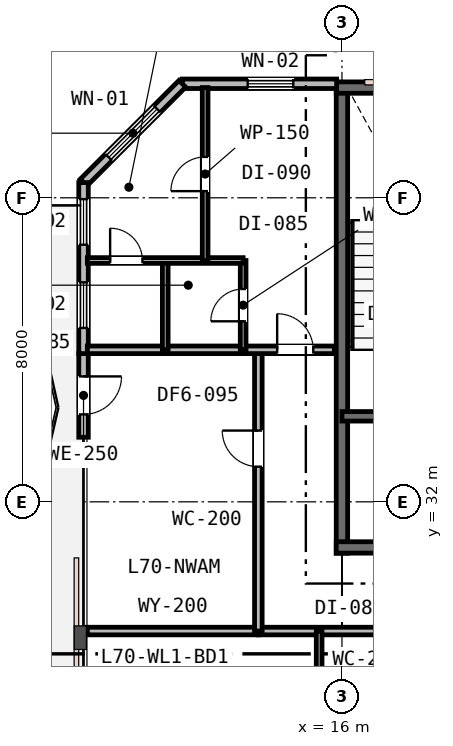
"""IFC4 building model, lengths in metres.
Left out: names, types, materials, properties, quantities, classifications, styles, units other than length and angle.
Written with IfcOpenShell. Run it as: python <this file> out.ifc"""

import sys

from ifc_helpers import new_model, si_unit, direction, frame, frame_2d, origin, place, context, subcontext, project, spatial, rectangle, extrude, element, fill, save


model = new_model("IFC4")
c1 = context("Model", 3, precision=1e-05, world=origin(), true_north=direction((0.0, 1.0)))
c2 = subcontext(c1, "Body", "Model", "MODEL_VIEW")
j1 = project(units=[si_unit("LENGTHUNIT", "METRE"), si_unit("PLANEANGLEUNIT", "RADIAN")], contexts=[c1])
p1 = place(None, origin())
s1 = spatial("IfcSite", under=j1, at=p1, CompositionType="ELEMENT")
p2 = place(p1, origin())
s2 = spatial("IfcBuilding", under=s1, at=p2, CompositionType="ELEMENT")
p3 = place(p2, frame((0.0, 0.0, 271.6)))
s3 = spatial("IfcBuildingStorey", under=s2, at=p3, CompositionType="ELEMENT", Elevation=271.6)
p4 = place(p3, frame((16.0, 30.65, 0.0), z_axis=(0.0, 0.0, 1.0), x_axis=(0.0, 1.0, 0.0)))
e1 = element("IfcWall", 1, at=p4, inside=s3, PredefinedType="SHEAR", context=c2, shape_type="SweptSolid", body=[
    extrude(rectangle(XDim=12.3, YDim=0.3, at=frame_2d((6.15, 0.0))), origin(), (0.0, 0.0, 1.0), 3.8),
])
p5 = place(p3, frame((15.85, 42.9, 0.0), z_axis=(0.0, 0.0, 1.0), x_axis=(1.0, 0.0, 0.0)))
e2 = element("IfcWall", 2, at=p5, inside=s3, PredefinedType="SHEAR", context=c2, shape_type="SweptSolid", body=[
    extrude(rectangle(XDim=24.3, YDim=0.3, at=frame_2d((12.15, 0.0))), origin(), (0.0, 0.0, 1.0), 3.8),
])
p6 = place(p3, frame((15.85, 30.8, 0.0), z_axis=(0.0, 0.0, 1.0), x_axis=(1.0, 0.0, 0.0)))
e3 = element("IfcWall", 3, at=p6, inside=s3, PredefinedType="SHEAR", context=c2, shape_type="SweptSolid", body=[
    extrude(rectangle(XDim=11.2, YDim=0.3, at=frame_2d((5.6, 0.0))), origin(), (0.0, 0.0, 1.0), 3.8),
])
p7 = place(p6, frame((2.45, 0.0, 0.0)))
e4 = element("IfcOpeningElement", 4, at=p7, cuts=e3, PredefinedType="OPENING", context=c2, shape_type="SweptSolid", body=[
    extrude(rectangle(XDim=1.1, YDim=2.15, at=frame_2d((0.55, 1.075))), frame((0.0, 0.16, 0.0), z_axis=(0.0, -1.0, 0.0), x_axis=(1.0, 0.0, 0.0)), (0.0, 0.0, 1.0), 0.32),
])
p8 = place(p3, frame((16.0, 34.25, 0.0), z_axis=(0.0, 0.0, 1.0), x_axis=(1.0, 0.0, 0.0)))
e5 = element("IfcWall", 5, at=p8, inside=s3, PredefinedType="SHEAR", context=c2, shape_type="SweptSolid", body=[
    extrude(rectangle(XDim=6.05, YDim=0.25, at=frame_2d((3.025, 0.0))), origin(), (0.0, 0.0, 1.0), 3.8),
])
p9 = place(p8, frame((1.25, 0.0, 0.0)))
e6 = element("IfcOpeningElement", 6, at=p9, cuts=e5, PredefinedType="OPENING", context=c2, shape_type="SweptSolid", body=[
    extrude(rectangle(XDim=1.0, YDim=2.15, at=frame_2d((0.5, 1.075))), frame((0.0, 0.135, 0.0), z_axis=(0.0, -1.0, 0.0), x_axis=(1.0, 0.0, 0.0)), (0.0, 0.0, 1.0), 0.27),
])
p10 = place(p8, frame((4.2, 0.0, 0.0)))
e7 = element("IfcOpeningElement", 7, at=p10, cuts=e5, PredefinedType="OPENING", context=c2, shape_type="SweptSolid", body=[
    extrude(rectangle(XDim=1.1, YDim=2.15, at=frame_2d((0.55, 1.075))), frame((0.0, 0.135, 0.0), z_axis=(0.0, -1.0, 0.0), x_axis=(1.0, 0.0, 0.0)), (0.0, 0.0, 1.0), 0.27),
])
p11 = place(p3, frame((15.86, 43.0, 0.0), z_axis=(0.0, 0.0, 1.0), x_axis=(-1.0, 0.0, 0.0)))
e8 = element("IfcWall", 8, at=p11, inside=s3, PredefinedType="STANDARD", context=c2, shape_type="SweptSolid", body=[
    extrude(rectangle(XDim=4.06, YDim=0.25, at=frame_2d((2.03, 0.0))), origin(), (0.0, 0.0, 1.0), 3.53),
])
p12 = place(p11, frame((1.14, 0.0, 0.85)))
e9 = element("IfcOpeningElement", 9, at=p12, cuts=e8, PredefinedType="OPENING", context=c2, shape_type="SweptSolid", body=[
    extrude(rectangle(XDim=1.2, YDim=1.6, at=frame_2d((0.6, 0.8))), frame((0.0, 0.135, 0.0), z_axis=(0.0, -1.0, 0.0), x_axis=(1.0, 0.0, 0.0)), (0.0, 0.0, 1.0), 0.27),
])
p13 = place(p3, frame((11.8, 43.0, 0.0), z_axis=(0.0, 0.0, 1.0), x_axis=(-0.707106781187, -0.707106781187, 0.0)))
e10 = element("IfcWall", 10, at=p13, inside=s3, PredefinedType="STANDARD", context=c2, shape_type="SweptSolid", body=[
    extrude(rectangle(XDim=3.677, YDim=0.25, at=frame_2d((1.839, 0.0))), origin(), (0.0, 0.0, 1.0), 3.53),
])
p14 = place(p13, frame((0.939, 0.0, 0.75)))
e11 = element("IfcOpeningElement", 11, at=p14, cuts=e10, PredefinedType="OPENING", context=c2, shape_type="SweptSolid", body=[
    extrude(rectangle(XDim=1.8, YDim=1.85, at=frame_2d((0.9, 0.925))), frame((0.0, 0.135, 0.0), z_axis=(0.0, -1.0, 0.0), x_axis=(1.0, 0.0, 0.0)), (0.0, 0.0, 1.0), 0.27),
])
p15 = place(p3, frame((9.2, 35.9, 0.0), z_axis=(0.0, 0.0, 1.0), x_axis=(0.0, -1.0, 0.0)))
e12 = element("IfcWall", 12, at=p15, inside=s3, PredefinedType="STANDARD", context=c2, shape_type="SweptSolid", body=[
    extrude(rectangle(XDim=2.2, YDim=0.25, at=frame_2d((1.1, 0.0))), origin(), (0.0, 0.0, 1.0), 3.53),
])
p16 = place(p15, frame((0.6, 0.0, 0.0)))
e13 = element("IfcOpeningElement", 13, at=p16, cuts=e12, PredefinedType="OPENING", context=c2, shape_type="SweptSolid", body=[
    extrude(rectangle(XDim=1.0, YDim=2.15, at=frame_2d((0.5, 1.075))), frame((0.0, 0.135, 0.0), z_axis=(0.0, -1.0, 0.0), x_axis=(1.0, 0.0, 0.0)), (0.0, 0.0, 1.0), 0.27),
])
p17 = place(p3, frame((9.2, 40.4, 0.0), z_axis=(0.0, 0.0, 1.0), x_axis=(0.0, -1.0, 0.0)))
e14 = element("IfcWall", 14, at=p17, inside=s3, PredefinedType="STANDARD", context=c2, shape_type="SweptSolid", body=[
    extrude(rectangle(XDim=4.5, YDim=0.25, at=frame_2d((2.25, 0.0))), origin(), (0.0, 0.0, 1.0), 3.53),
])
p18 = place(p17, frame((0.435, 0.0, 0.85)))
e15 = element("IfcOpeningElement", 15, at=p18, cuts=e14, PredefinedType="OPENING", context=c2, shape_type="SweptSolid", body=[
    extrude(rectangle(XDim=1.2, YDim=1.6, at=frame_2d((0.6, 0.8))), frame((0.0, 0.135, 0.0), z_axis=(0.0, -1.0, 0.0), x_axis=(1.0, 0.0, 0.0)), (0.0, 0.0, 1.0), 0.27),
])
p19 = place(p17, frame((2.625, 0.0, 0.85)))
e16 = element("IfcOpeningElement", 16, at=p19, cuts=e14, PredefinedType="OPENING", context=c2, shape_type="SweptSolid", body=[
    extrude(rectangle(XDim=1.2, YDim=1.6, at=frame_2d((0.6, 0.8))), frame((0.0, 0.135, 0.0), z_axis=(0.0, -1.0, 0.0), x_axis=(1.0, 0.0, 0.0)), (0.0, 0.0, 1.0), 0.27),
])
p20 = place(p3, frame((9.3, 28.6, 0.0), z_axis=(0.0, 0.0, 1.0), x_axis=(1.0, 0.0, 0.0)))
e17 = element("IfcWall", 17, at=p20, inside=s3, PredefinedType="PARTITIONING", context=c2, shape_type="SweptSolid", body=[
    extrude(rectangle(XDim=4.5, YDim=0.2, at=frame_2d((2.25, 0.0))), origin(), (0.0, 0.0, 1.0), 3.53),
])
p21 = place(p3, frame((13.8, 28.6, 0.0), z_axis=(0.0, 0.0, 1.0), x_axis=(1.0, 0.0, 0.0)))
e18 = element("IfcWall", 18, at=p21, inside=s3, PredefinedType="PARTITIONING", context=c2, shape_type="SweptSolid", body=[
    extrude(rectangle(XDim=4.2, YDim=0.2, at=frame_2d((2.1, 0.0))), origin(), (0.0, 0.0, 1.0), 3.16),
])
p22 = place(p3, frame((13.8, 28.6, 0.0), z_axis=(0.0, 0.0, 1.0), x_axis=(0.0, 1.0, 0.0)))
e19 = element("IfcWall", 19, at=p22, inside=s3, PredefinedType="PARTITIONING", context=c2, shape_type="SweptSolid", body=[
    extrude(rectangle(XDim=7.4, YDim=0.2, at=frame_2d((3.7, 0.0))), origin(), (0.0, 0.0, 1.0), 3.53),
])
p23 = place(p22, frame((4.325, 0.0, 0.0)))
e20 = element("IfcOpeningElement", 20, at=p23, cuts=e19, PredefinedType="OPENING", context=c2, shape_type="SweptSolid", body=[
    extrude(rectangle(XDim=0.95, YDim=2.15, at=frame_2d((0.475, 1.075))), frame((0.0, 0.11, 0.0), z_axis=(0.0, -1.0, 0.0), x_axis=(1.0, 0.0, 0.0)), (0.0, 0.0, 1.0), 0.22),
])
p24 = place(p3, frame((9.3, 36.0, 0.0), z_axis=(0.0, 0.0, 1.0), x_axis=(1.0, 0.0, 0.0)))
e21 = element("IfcWall", 21, at=p24, inside=s3, PredefinedType="PARTITIONING", context=c2, shape_type="SweptSolid", body=[
    extrude(rectangle(XDim=6.5, YDim=0.2, at=frame_2d((3.25, 0.0))), origin(), (0.0, 0.0, 1.0), 3.53),
])
p25 = place(p24, frame((4.995, 0.0, 0.0)))
e22 = element("IfcOpeningElement", 22, at=p25, cuts=e21, PredefinedType="OPENING", context=c2, shape_type="SweptSolid", body=[
    extrude(rectangle(XDim=0.95, YDim=2.15, at=frame_2d((0.475, 1.075))), frame((0.0, 0.11, 0.0), z_axis=(0.0, -1.0, 0.0), x_axis=(1.0, 0.0, 0.0)), (0.0, 0.0, 1.0), 0.22),
])
p26 = place(p3, frame((13.4, 36.0, 0.0), z_axis=(0.0, 0.0, 1.0), x_axis=(0.0, 1.0, 0.0)))
e23 = element("IfcWall", 23, at=p26, inside=s3, PredefinedType="PARTITIONING", context=c2, shape_type="SweptSolid", body=[
    extrude(rectangle(XDim=2.35, YDim=0.15, at=frame_2d((1.175, 0.0))), origin(), (0.0, 0.0, 1.0), 3.53),
])
p27 = place(p26, frame((0.75, 0.0, 0.0)))
e24 = element("IfcOpeningElement", 24, at=p27, cuts=e23, PredefinedType="OPENING", context=c2, shape_type="SweptSolid", body=[
    extrude(rectangle(XDim=0.85, YDim=2.15, at=frame_2d((0.425, 1.075))), frame((0.0, 0.085, 0.0), z_axis=(0.0, -1.0, 0.0), x_axis=(1.0, 0.0, 0.0)), (0.0, 0.0, 1.0), 0.17),
])
p28 = place(p3, frame((11.35, 36.0, 0.0), z_axis=(0.0, 0.0, 1.0), x_axis=(0.0, 1.0, 0.0)))
e25 = element("IfcWall", 25, at=p28, inside=s3, PredefinedType="PARTITIONING", context=c2, shape_type="SweptSolid", body=[
    extrude(rectangle(XDim=2.35, YDim=0.15, at=frame_2d((1.175, 0.0))), origin(), (0.0, 0.0, 1.0), 3.53),
])
p29 = place(p3, frame((9.3, 38.35, 0.0), z_axis=(0.0, 0.0, 1.0), x_axis=(1.0, 0.0, 0.0)))
e26 = element("IfcWall", 26, at=p29, inside=s3, PredefinedType="PARTITIONING", context=c2, shape_type="SweptSolid", body=[
    extrude(rectangle(XDim=4.1, YDim=0.15, at=frame_2d((2.05, 0.0))), origin(), (0.0, 0.0, 1.0), 3.53),
])
p30 = place(p29, frame((0.6, 0.0, 0.0)))
e27 = element("IfcOpeningElement", 27, at=p30, cuts=e26, PredefinedType="OPENING", context=c2, shape_type="SweptSolid", body=[
    extrude(rectangle(XDim=0.85, YDim=2.15, at=frame_2d((0.425, 1.075))), frame((0.0, 0.085, 0.0), z_axis=(0.0, -1.0, 0.0), x_axis=(1.0, 0.0, 0.0)), (0.0, 0.0, 1.0), 0.17),
])
p31 = place(p3, frame((12.4, 38.35, 0.0), z_axis=(0.0, 0.0, 1.0), x_axis=(0.0, 1.0, 0.0)))
e28 = element("IfcWall", 28, at=p31, inside=s3, PredefinedType="PARTITIONING", context=c2, shape_type="SweptSolid", body=[
    extrude(rectangle(XDim=4.55, YDim=0.15, at=frame_2d((2.275, 0.0))), origin(), (0.0, 0.0, 1.0), 3.53),
])
p32 = place(p31, frame((1.825, 0.0, 0.0)))
e29 = element("IfcOpeningElement", 29, at=p32, cuts=e28, PredefinedType="OPENING", context=c2, shape_type="SweptSolid", body=[
    extrude(rectangle(XDim=0.9, YDim=2.15, at=frame_2d((0.45, 1.075))), frame((0.0, 0.085, 0.0), z_axis=(0.0, -1.0, 0.0), x_axis=(1.0, 0.0, 0.0)), (0.0, 0.0, 1.0), 0.17),
])
p33 = place(p3, frame((15.4, 19.396, 0.0), z_axis=(0.0, 0.0, 1.0), x_axis=(0.0, 1.0, 0.0)))
e30 = element("IfcWall", 30, at=p33, inside=s3, PredefinedType="PARTITIONING", context=c2, shape_type="SweptSolid", body=[
    extrude(rectangle(XDim=9.204, YDim=0.15, at=frame_2d((4.602, 0.0))), origin(), (0.0, 0.0, 1.0), 3.53),
])
p34 = place(p33, frame((0.6, 0.0, 0.0)))
e31 = element("IfcOpeningElement", 31, at=p34, cuts=e30, PredefinedType="OPENING", context=c2, shape_type="SweptSolid", body=[
    extrude(rectangle(XDim=0.85, YDim=2.15, at=frame_2d((0.425, 1.075))), frame((0.0, 0.085, 0.0), z_axis=(0.0, -1.0, 0.0), x_axis=(1.0, 0.0, 0.0)), (0.0, 0.0, 1.0), 0.17),
])
p35 = place(p33, frame((2.65, 0.0, 0.0)))
e32 = element("IfcOpeningElement", 32, at=p35, cuts=e30, PredefinedType="OPENING", context=c2, shape_type="SweptSolid", body=[
    extrude(rectangle(XDim=0.85, YDim=2.15, at=frame_2d((0.425, 1.075))), frame((0.0, 0.085, 0.0), z_axis=(0.0, -1.0, 0.0), x_axis=(1.0, 0.0, 0.0)), (0.0, 0.0, 1.0), 0.17),
])
p36 = place(p33, frame((6.593, 0.0, 0.0)))
e33 = element("IfcOpeningElement", 33, at=p36, cuts=e30, PredefinedType="OPENING", context=c2, shape_type="SweptSolid", body=[
    extrude(rectangle(XDim=0.85, YDim=2.15, at=frame_2d((0.425, 1.075))), frame((0.0, 0.085, 0.0), z_axis=(0.0, -1.0, 0.0), x_axis=(1.0, 0.0, 0.0)), (0.0, 0.0, 1.0), 0.17),
])
p37 = place(p12, origin())
e34 = element("IfcWindow", 34, at=p37, inside=s3, PartitioningType="SINGLE_PANEL", PredefinedType="WINDOW", context=c2, shape_type="SweptSolid", body=[
    extrude(rectangle(XDim=1.2, YDim=1.6, at=frame_2d((0.6, 0.8))), frame((0.0, 0.03, 0.0), z_axis=(0.0, -1.0, 0.0), x_axis=(1.0, 0.0, 0.0)), (0.0, 0.0, 1.0), 0.06),
])
fill(e9, e34)
p38 = place(p14, origin())
e35 = element("IfcWindow", 35, at=p38, inside=s3, PartitioningType="SINGLE_PANEL", PredefinedType="WINDOW", context=c2, shape_type="SweptSolid", body=[
    extrude(rectangle(XDim=1.8, YDim=1.85, at=frame_2d((0.9, 0.925))), frame((0.0, 0.03, 0.0), z_axis=(0.0, -1.0, 0.0), x_axis=(1.0, 0.0, 0.0)), (0.0, 0.0, 1.0), 0.06),
])
fill(e11, e35)
p39 = place(p16, origin())
e36 = element("IfcDoor", 36, at=p39, inside=s3, OperationType="SINGLE_SWING_LEFT", PredefinedType="DOOR", context=c2, shape_type="SweptSolid", body=[
    extrude(rectangle(XDim=1.0, YDim=2.15, at=frame_2d((0.5, 1.075))), frame((0.0, 0.025, 0.0), z_axis=(0.0, -1.0, 0.0), x_axis=(1.0, 0.0, 0.0)), (0.0, 0.0, 1.0), 0.05),
])
fill(e13, e36)
p40 = place(p18, origin())
e37 = element("IfcWindow", 37, at=p40, inside=s3, PartitioningType="SINGLE_PANEL", PredefinedType="WINDOW", context=c2, shape_type="SweptSolid", body=[
    extrude(rectangle(XDim=1.2, YDim=1.6, at=frame_2d((0.6, 0.8))), frame((0.0, 0.03, 0.0), z_axis=(0.0, -1.0, 0.0), x_axis=(1.0, 0.0, 0.0)), (0.0, 0.0, 1.0), 0.06),
])
fill(e15, e37)
p41 = place(p19, origin())
e38 = element("IfcWindow", 38, at=p41, inside=s3, PartitioningType="SINGLE_PANEL", PredefinedType="WINDOW", context=c2, shape_type="SweptSolid", body=[
    extrude(rectangle(XDim=1.2, YDim=1.6, at=frame_2d((0.6, 0.8))), frame((0.0, 0.03, 0.0), z_axis=(0.0, -1.0, 0.0), x_axis=(1.0, 0.0, 0.0)), (0.0, 0.0, 1.0), 0.06),
])
fill(e16, e38)
p42 = place(p23, origin())
e39 = element("IfcDoor", 39, at=p42, inside=s3, OperationType="SINGLE_SWING_RIGHT", PredefinedType="DOOR", context=c2, shape_type="SweptSolid", body=[
    extrude(rectangle(XDim=0.95, YDim=2.15, at=frame_2d((0.475, 1.075))), frame((0.0, 0.025, 0.0), z_axis=(0.0, -1.0, 0.0), x_axis=(1.0, 0.0, 0.0)), (0.0, 0.0, 1.0), 0.05),
])
fill(e20, e39)
p43 = place(p25, origin())
e40 = element("IfcDoor", 40, at=p43, inside=s3, OperationType="SINGLE_SWING_LEFT", PredefinedType="DOOR", context=c2, shape_type="SweptSolid", body=[
    extrude(rectangle(XDim=0.95, YDim=2.15, at=frame_2d((0.475, 1.075))), frame((0.0, 0.025, 0.0), z_axis=(0.0, -1.0, 0.0), x_axis=(1.0, 0.0, 0.0)), (0.0, 0.0, 1.0), 0.05),
])
fill(e22, e40)
p44 = place(p27, origin())
e41 = element("IfcDoor", 41, at=p44, inside=s3, OperationType="SINGLE_SWING_LEFT", PredefinedType="DOOR", context=c2, shape_type="SweptSolid", body=[
    extrude(rectangle(XDim=0.85, YDim=2.15, at=frame_2d((0.425, 1.075))), frame((0.0, 0.025, 0.0), z_axis=(0.0, -1.0, 0.0), x_axis=(1.0, 0.0, 0.0)), (0.0, 0.0, 1.0), 0.05),
])
fill(e24, e41)
p45 = place(p30, origin())
e42 = element("IfcDoor", 42, at=p45, inside=s3, OperationType="SINGLE_SWING_LEFT", PredefinedType="DOOR", context=c2, shape_type="SweptSolid", body=[
    extrude(rectangle(XDim=0.85, YDim=2.15, at=frame_2d((0.425, 1.075))), frame((0.0, 0.025, 0.0), z_axis=(0.0, -1.0, 0.0), x_axis=(1.0, 0.0, 0.0)), (0.0, 0.0, 1.0), 0.05),
])
fill(e27, e42)
p46 = place(p32, origin())
e43 = element("IfcDoor", 43, at=p46, inside=s3, OperationType="SINGLE_SWING_LEFT", PredefinedType="DOOR", context=c2, shape_type="SweptSolid", body=[
    extrude(rectangle(XDim=0.9, YDim=2.15, at=frame_2d((0.45, 1.075))), frame((0.0, 0.025, 0.0), z_axis=(0.0, -1.0, 0.0), x_axis=(1.0, 0.0, 0.0)), (0.0, 0.0, 1.0), 0.05),
])
fill(e29, e43)
save(model, sys.argv[1])
